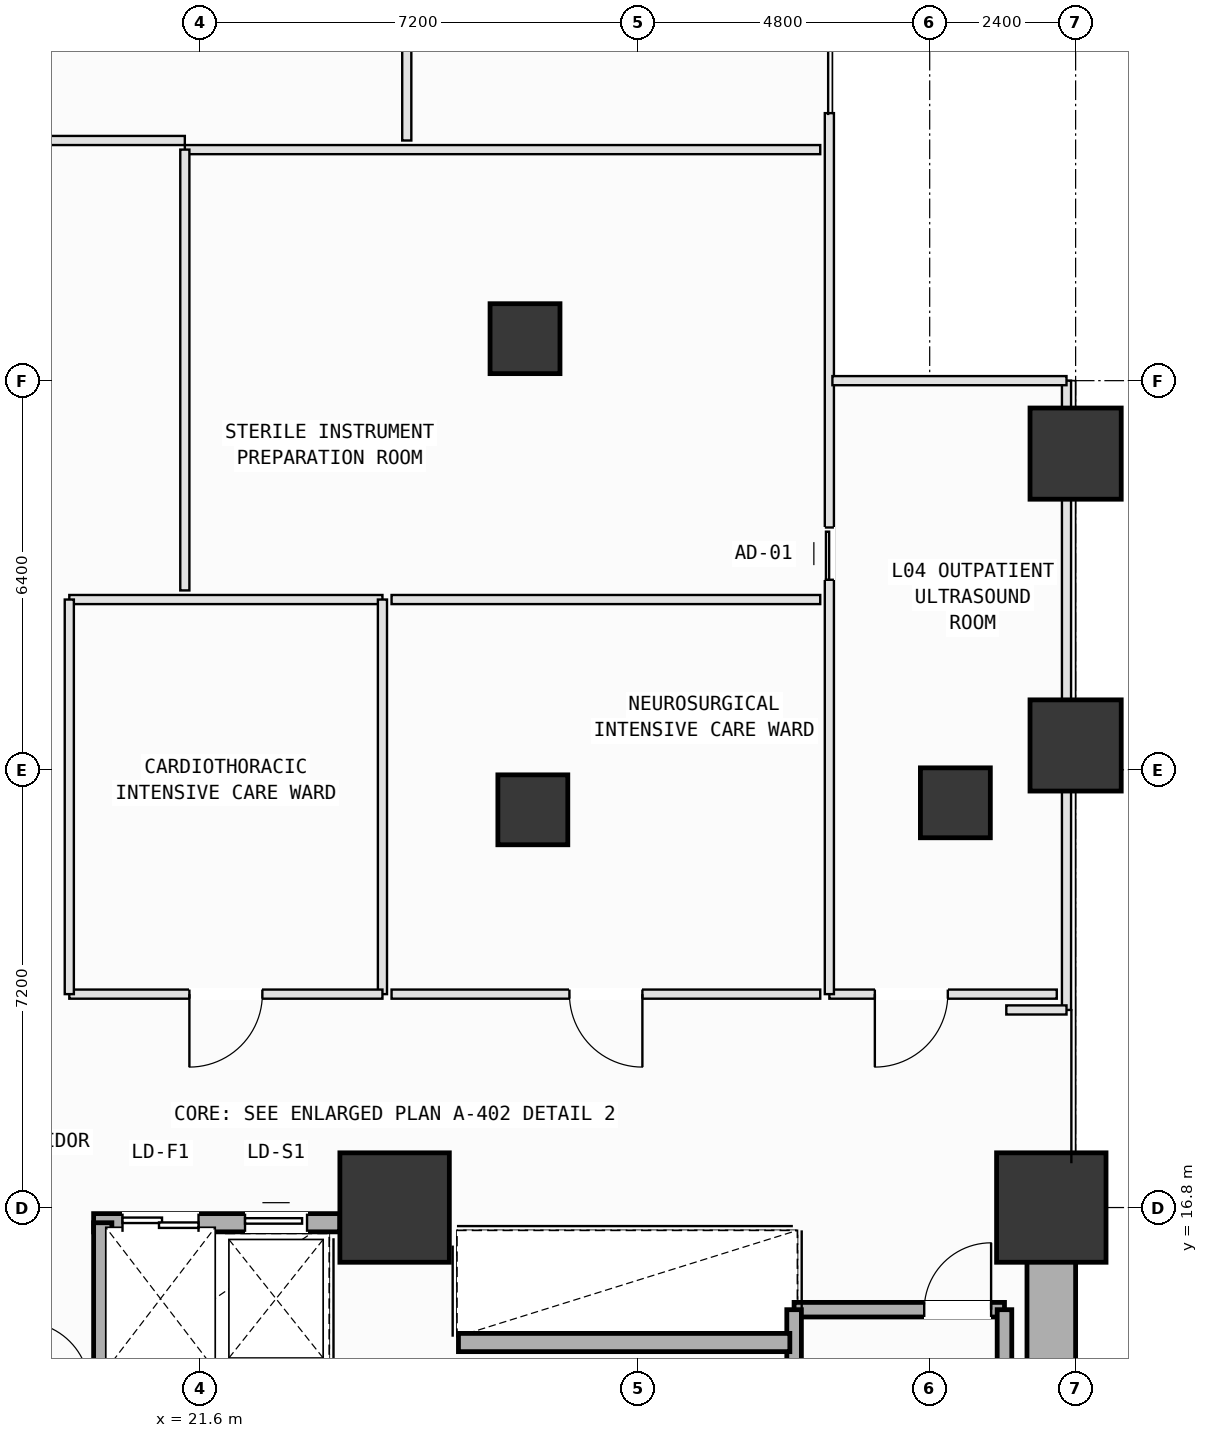
"""IFC4 building model, lengths in metres.
Left out: names, types, materials, properties, quantities, classifications, styles, units other than length and angle.
Written with IfcOpenShell. Run it as: python <this file> out.ifc"""

import sys

from ifc_helpers import new_model, si_unit, direction, frame, frame_2d, origin, origin_2d, place, context, subcontext, project, spatial, rectangle, extrude, element, fill, save


model = new_model("IFC4")
c1 = context("Model", 3, precision=1e-05, world=origin(), true_north=direction((0.0, 1.0)))
c2 = subcontext(c1, "Body", "Model", "MODEL_VIEW")
j1 = project(units=[si_unit("LENGTHUNIT", "METRE"), si_unit("PLANEANGLEUNIT", "RADIAN")], contexts=[c1])
p1 = place(None, origin())
s1 = spatial("IfcSite", under=j1, at=p1, CompositionType="ELEMENT")
p2 = place(p1, origin())
s2 = spatial("IfcBuilding", under=s1, at=p2, CompositionType="ELEMENT")
p3 = place(p2, frame((0.0, 0.0, 21.6)))
s3 = spatial("IfcBuildingStorey", under=s2, at=p3, CompositionType="ELEMENT", Elevation=21.6)
for number, where, z_axis, x_axis in (
    (1, (24.8, 16.8, 0.0), (0.0, 0.0, 1.0), (1.0, 0.0, 0.0)),
    (2, (35.6, 16.8, 0.0), (0.0, 0.0, 1.0), (1.0, 0.0, 0.0)),
):
    element("IfcColumn", number, at=place(p3, frame(where, z_axis=z_axis, x_axis=x_axis)), inside=s3, PredefinedType="COLUMN", context=c2, shape_type="SweptSolid", body=[
        extrude(rectangle(XDim=1.8, YDim=1.8, at=origin_2d()), origin(), (0.0, 0.0, 1.0), 5.4),
    ])
for number, where, z_axis, x_axis in (
    (3, (36.0, 24.4, 0.0), (0.0, 0.0, 1.0), (1.0, 0.0, 0.0)),
    (4, (36.0, 29.2, 0.0), (0.0, 0.0, 1.0), (1.0, 0.0, 0.0)),
):
    element("IfcColumn", number, at=place(p3, frame(where, z_axis=z_axis, x_axis=x_axis)), inside=s3, PredefinedType="PILASTER", context=c2, shape_type="SweptSolid", body=[
        extrude(rectangle(XDim=1.5, YDim=1.5, at=origin_2d()), origin(), (0.0, 0.0, 1.0), 5.4),
    ])
for number, where, z_axis, x_axis in (
    (5, (34.022, 23.457, 0.0), (0.0, 0.0, 1.0), (1.0, 0.0, 0.0)),
    (6, (27.073, 23.342, 0.0), (0.0, 0.0, 1.0), (1.0, 0.0, 0.0)),
    (7, (26.945, 31.091, 0.0), (0.0, 0.0, 1.0), (1.0, 0.0, 0.0)),
):
    element("IfcColumn", number, at=place(p3, frame(where, z_axis=z_axis, x_axis=x_axis)), inside=s3, PredefinedType="COLUMN", context=c2, shape_type="SweptSolid", body=[
        extrude(rectangle(XDim=1.15, YDim=1.15, at=origin_2d()), origin(), (0.0, 0.0, 1.0), 5.4),
    ])
p4 = place(p3, frame((31.37, 15.12, 0.0), z_axis=(0.0, 0.0, 1.0), x_axis=(1.0, 0.0, 0.0)))
e8 = element("IfcWall", 8, at=p4, inside=s3, PredefinedType="SOLIDWALL", context=c2, shape_type="SweptSolid", body=[
    extrude(rectangle(XDim=3.46, YDim=0.24, at=frame_2d((1.73, 0.0))), origin(), (0.0, 0.0, 1.0), 5.1),
])
p5 = place(p4, frame((2.14, 0.0, 0.0)))
e9 = element("IfcOpeningElement", 9, at=p5, cuts=e8, PredefinedType="OPENING", context=c2, shape_type="SweptSolid", body=[
    extrude(rectangle(XDim=1.1, YDim=2.15, at=frame_2d((0.55, 1.075))), frame((0.0, 0.13, 0.0), z_axis=(0.0, -1.0, 0.0), x_axis=(1.0, 0.0, 0.0)), (0.0, 0.0, 1.0), 0.26),
])
for number, where, z_axis, x_axis in (
    (10, (34.83, 15.12, 0.0), (0.0, 0.0, 1.0), (0.0, -1.0, 0.0)),
    (11, (31.37, 8.2, 0.0), (0.0, 0.0, 1.0), (0.0, 1.0, 0.0)),
):
    element("IfcWall", number, at=place(p3, frame(where, z_axis=z_axis, x_axis=x_axis)), inside=s3, PredefinedType="SOLIDWALL", context=c2, shape_type="SweptSolid", body=[
        extrude(rectangle(XDim=6.92, YDim=0.24, at=frame_2d((3.46, 0.0))), origin(), (0.0, 0.0, 1.0), 5.1),
    ])
p6 = place(p3, frame((35.6, 7.8, 0.0), z_axis=(0.0, 0.0, 1.0), x_axis=(0.0, 1.0, 0.0)))
e12 = element("IfcWall", 12, at=p6, inside=s3, PredefinedType="SHEAR", context=c2, shape_type="SweptSolid", body=[
    extrude(rectangle(XDim=9.0, YDim=0.8, at=frame_2d((4.5, 0.0))), origin(), (0.0, 0.0, 1.0), 5.1),
])
p7 = place(p3, frame((19.85, 16.55, 0.0), z_axis=(0.0, 0.0, 1.0), x_axis=(1.0, 0.0, 0.0)))
e13 = element("IfcWall", 13, at=p7, inside=s3, PredefinedType="SOLIDWALL", context=c2, shape_type="SweptSolid", body=[
    extrude(rectangle(XDim=4.05, YDim=0.3, at=frame_2d((2.025, 0.0))), origin(), (0.0, 0.0, 1.0), 5.1),
])
p8 = place(p7, frame((0.475, 0.0, 0.0)))
e14 = element("IfcOpeningElement", 14, at=p8, cuts=e13, PredefinedType="OPENING", context=c2, shape_type="SweptSolid", body=[
    extrude(rectangle(XDim=1.25, YDim=2.18, at=frame_2d((0.625, 1.09))), frame((0.0, 0.16, 0.0), z_axis=(0.0, -1.0, 0.0), x_axis=(1.0, 0.0, 0.0)), (0.0, 0.0, 1.0), 0.32),
])
p9 = place(p7, frame((2.49, 0.0, 0.0)))
e15 = element("IfcOpeningElement", 15, at=p9, cuts=e13, PredefinedType="OPENING", context=c2, shape_type="SweptSolid", body=[
    extrude(rectangle(XDim=1.02, YDim=2.12, at=frame_2d((0.51, 1.06))), frame((0.0, 0.16, 0.0), z_axis=(0.0, -1.0, 0.0), x_axis=(1.0, 0.0, 0.0)), (0.0, 0.0, 1.0), 0.32),
])
p10 = place(p3, frame((20.0, 13.82, 0.0), z_axis=(0.0, 0.0, 1.0), x_axis=(0.0, 1.0, 0.0)))
e16 = element("IfcWall", 16, at=p10, inside=s3, PredefinedType="SOLIDWALL", context=c2, shape_type="SweptSolid", body=[
    extrude(rectangle(XDim=2.73, YDim=0.3, at=frame_2d((1.365, 0.0))), origin(), (0.0, 0.0, 1.0), 5.1),
])
p11 = place(p3, frame((25.85, 14.58, 0.0), z_axis=(0.0, 0.0, 1.0), x_axis=(1.0, 0.0, 0.0)))
e17 = element("IfcWall", 17, at=p11, inside=s3, PredefinedType="SOLIDWALL", context=c2, shape_type="SweptSolid", body=[
    extrude(rectangle(XDim=5.45, YDim=0.3, at=frame_2d((2.725, 0.0))), origin(), (0.0, 0.0, 1.0), 5.1),
])
p12 = place(p3, frame((35.85, 30.4, 0.0), z_axis=(0.0, 0.0, 1.0), x_axis=(0.0, -1.0, 0.0)))
e18 = element("IfcWall", 18, at=p12, inside=s3, PredefinedType="PARTITIONING", context=c2, shape_type="SweptSolid", body=[
    extrude(rectangle(XDim=10.35, YDim=0.15, at=frame_2d((5.175, 0.0))), origin(), (0.0, 0.0, 1.0), 2.685),
])
p13 = place(p3, frame((35.85, 20.05, 0.0), z_axis=(0.0, 0.0, 1.0), x_axis=(-1.0, 0.0, 0.0)))
e19 = element("IfcWall", 19, at=p13, inside=s3, PredefinedType="PARTITIONING", context=c2, shape_type="SweptSolid", body=[
    extrude(rectangle(XDim=0.99, YDim=0.15, at=frame_2d((0.495, 0.0))), origin(), (0.0, 0.0, 1.0), 5.1),
])
p14 = place(p3, frame((35.69, 20.31, 0.0), z_axis=(0.0, 0.0, 1.0), x_axis=(-1.0, 0.0, 0.0)))
e20 = element("IfcWall", 20, at=p14, inside=s3, PredefinedType="PARTITIONING", context=c2, shape_type="SweptSolid", body=[
    extrude(rectangle(XDim=3.74, YDim=0.15, at=frame_2d((1.87, 0.0))), origin(), (0.0, 0.0, 1.0), 5.1),
])
p15 = place(p14, frame((1.792, 0.0, 0.0)))
e21 = element("IfcOpeningElement", 21, at=p15, cuts=e20, PredefinedType="OPENING", context=c2, shape_type="SweptSolid", body=[
    extrude(rectangle(XDim=1.2, YDim=2.15, at=frame_2d((0.6, 1.075))), frame((0.0, 0.085, 0.0), z_axis=(0.0, -1.0, 0.0), x_axis=(1.0, 0.0, 0.0)), (0.0, 0.0, 1.0), 0.17),
])
p16 = place(p3, frame((31.95, 20.31, 0.0), z_axis=(0.0, 0.0, 1.0), x_axis=(0.0, 1.0, 0.0)))
e22 = element("IfcWall", 22, at=p16, inside=s3, PredefinedType="PARTITIONING", context=c2, shape_type="SweptSolid", body=[
    extrude(rectangle(XDim=14.49, YDim=0.15, at=frame_2d((7.245, 0.0))), origin(), (0.0, 0.0, 1.0), 5.1),
])
p17 = place(p16, frame((6.815, 0.0, 0.0)))
e23 = element("IfcOpeningElement", 23, at=p17, cuts=e22, PredefinedType="OPENING", context=c2, shape_type="SweptSolid", body=[
    extrude(rectangle(XDim=0.86, YDim=2.06, at=frame_2d((0.43, 1.03))), frame((0.0, 0.085, 0.0), z_axis=(0.0, -1.0, 0.0), x_axis=(1.0, 0.0, 0.0)), (0.0, 0.0, 1.0), 0.17),
])
p18 = place(p3, frame((32.0, 30.4, 0.0), z_axis=(0.0, 0.0, 1.0), x_axis=(1.0, 0.0, 0.0)))
e24 = element("IfcWall", 24, at=p18, inside=s3, PredefinedType="PARTITIONING", context=c2, shape_type="SweptSolid", body=[
    extrude(rectangle(XDim=3.85, YDim=0.15, at=frame_2d((1.925, 0.0))), origin(), (0.0, 0.0, 1.0), 2.685),
])
p19 = place(p3, frame((19.45, 26.8, 0.0), z_axis=(0.0, 0.0, 1.0), x_axis=(1.0, 0.0, 0.0)))
e25 = element("IfcWall", 25, at=p19, inside=s3, PredefinedType="PARTITIONING", context=c2, shape_type="SweptSolid", body=[
    extrude(rectangle(XDim=5.15, YDim=0.15, at=frame_2d((2.575, 0.0))), origin(), (0.0, 0.0, 1.0), 5.1),
])
p20 = place(p3, frame((24.6, 26.8, 0.0), z_axis=(0.0, 0.0, 1.0), x_axis=(0.0, -1.0, 0.0)))
e26 = element("IfcWall", 26, at=p20, inside=s3, PredefinedType="PARTITIONING", context=c2, shape_type="SweptSolid", body=[
    extrude(rectangle(XDim=6.49, YDim=0.15, at=frame_2d((3.245, 0.0))), origin(), (0.0, 0.0, 1.0), 5.1),
])
p21 = place(p3, frame((24.6, 20.31, 0.0), z_axis=(0.0, 0.0, 1.0), x_axis=(-1.0, 0.0, 0.0)))
e27 = element("IfcWall", 27, at=p21, inside=s3, PredefinedType="PARTITIONING", context=c2, shape_type="SweptSolid", body=[
    extrude(rectangle(XDim=5.15, YDim=0.15, at=frame_2d((2.575, 0.0))), origin(), (0.0, 0.0, 1.0), 5.1),
])
p22 = place(p21, frame((1.975, 0.0, 0.0)))
e28 = element("IfcOpeningElement", 28, at=p22, cuts=e27, PredefinedType="OPENING", context=c2, shape_type="SweptSolid", body=[
    extrude(rectangle(XDim=1.2, YDim=2.15, at=frame_2d((0.6, 1.075))), frame((0.0, 0.085, 0.0), z_axis=(0.0, -1.0, 0.0), x_axis=(1.0, 0.0, 0.0)), (0.0, 0.0, 1.0), 0.17),
])
p23 = place(p3, frame((19.45, 20.31, 0.0), z_axis=(0.0, 0.0, 1.0), x_axis=(0.0, 1.0, 0.0)))
e29 = element("IfcWall", 29, at=p23, inside=s3, PredefinedType="PARTITIONING", context=c2, shape_type="SweptSolid", body=[
    extrude(rectangle(XDim=6.49, YDim=0.15, at=frame_2d((3.245, 0.0))), origin(), (0.0, 0.0, 1.0), 5.1),
])
p24 = place(p3, frame((24.75, 26.8, 0.0), z_axis=(0.0, 0.0, 1.0), x_axis=(1.0, 0.0, 0.0)))
e30 = element("IfcWall", 30, at=p24, inside=s3, PredefinedType="PARTITIONING", context=c2, shape_type="SweptSolid", body=[
    extrude(rectangle(XDim=7.05, YDim=0.15, at=frame_2d((3.525, 0.0))), origin(), (0.0, 0.0, 1.0), 5.1),
])
p25 = place(p3, frame((31.8, 20.31, 0.0), z_axis=(0.0, 0.0, 1.0), x_axis=(-1.0, 0.0, 0.0)))
e31 = element("IfcWall", 31, at=p25, inside=s3, PredefinedType="PARTITIONING", context=c2, shape_type="SweptSolid", body=[
    extrude(rectangle(XDim=7.05, YDim=0.15, at=frame_2d((3.525, 0.0))), origin(), (0.0, 0.0, 1.0), 5.1),
])
p26 = place(p25, frame((2.925, 0.0, 0.0)))
e32 = element("IfcOpeningElement", 32, at=p26, cuts=e31, PredefinedType="OPENING", context=c2, shape_type="SweptSolid", body=[
    extrude(rectangle(XDim=1.2, YDim=2.15, at=frame_2d((0.6, 1.075))), frame((0.0, 0.085, 0.0), z_axis=(0.0, -1.0, 0.0), x_axis=(1.0, 0.0, 0.0)), (0.0, 0.0, 1.0), 0.17),
])
p27 = place(p3, frame((21.35, 34.2, 0.0), z_axis=(0.0, 0.0, 1.0), x_axis=(1.0, 0.0, 0.0)))
e33 = element("IfcWall", 33, at=p27, inside=s3, PredefinedType="PARTITIONING", context=c2, shape_type="SweptSolid", body=[
    extrude(rectangle(XDim=10.45, YDim=0.15, at=frame_2d((5.225, 0.0))), origin(), (0.0, 0.0, 1.0), 5.1),
])
p28 = place(p3, frame((21.35, 26.95, 0.0), z_axis=(0.0, 0.0, 1.0), x_axis=(0.0, 1.0, 0.0)))
e34 = element("IfcWall", 34, at=p28, inside=s3, PredefinedType="PARTITIONING", context=c2, shape_type="SweptSolid", body=[
    extrude(rectangle(XDim=7.25, YDim=0.15, at=frame_2d((3.625, 0.0))), origin(), (0.0, 0.0, 1.0), 5.1),
])
p29 = place(p3, frame((25.0, 41.5, 0.0), z_axis=(0.0, 0.0, 1.0), x_axis=(0.0, -1.0, 0.0)))
e35 = element("IfcWall", 35, at=p29, inside=s3, PredefinedType="PARTITIONING", context=c2, shape_type="SweptSolid", body=[
    extrude(rectangle(XDim=7.15, YDim=0.15, at=frame_2d((3.575, 0.0))), origin(), (0.0, 0.0, 1.0), 5.1),
])
p30 = place(p3, frame((21.35, 34.35, 0.0), z_axis=(0.0, 0.0, 1.0), x_axis=(-1.0, 0.0, 0.0)))
e36 = element("IfcWall", 36, at=p30, inside=s3, PredefinedType="PARTITIONING", context=c2, shape_type="SweptSolid", body=[
    extrude(rectangle(XDim=3.2, YDim=0.15, at=frame_2d((1.6, 0.0))), origin(), (0.0, 0.0, 1.0), 5.1),
])
p31 = place(p5, origin())
e37 = element("IfcDoor", 37, at=p31, inside=s3, OperationType="SINGLE_SWING_RIGHT", PredefinedType="DOOR", context=c2, shape_type="SweptSolid", body=[
    extrude(rectangle(XDim=1.1, YDim=2.15, at=frame_2d((0.55, 1.075))), frame((0.0, 0.025, 0.0), z_axis=(0.0, -1.0, 0.0), x_axis=(1.0, 0.0, 0.0)), (0.0, 0.0, 1.0), 0.05),
])
fill(e9, e37)
p32 = place(p8, origin())
e38 = element("IfcDoor", 38, at=p32, inside=s3, OperationType="DOUBLE_DOOR_SLIDING", PredefinedType="DOOR", context=c2, shape_type="SweptSolid", body=[
    extrude(rectangle(XDim=1.25, YDim=2.18, at=frame_2d((0.625, 1.09))), frame((0.0, 0.025, 0.0), z_axis=(0.0, -1.0, 0.0), x_axis=(1.0, 0.0, 0.0)), (0.0, 0.0, 1.0), 0.05),
])
fill(e14, e38)
p33 = place(p9, origin())
e39 = element("IfcDoor", 39, at=p33, inside=s3, OperationType="SLIDING_TO_LEFT", PredefinedType="DOOR", context=c2, shape_type="SweptSolid", body=[
    extrude(rectangle(XDim=1.02, YDim=2.12, at=frame_2d((0.51, 1.06))), frame((0.0, 0.025, 0.0), z_axis=(0.0, -1.0, 0.0), x_axis=(1.0, 0.0, 0.0)), (0.0, 0.0, 1.0), 0.05),
])
fill(e15, e39)
p34 = place(p15, origin())
e40 = element("IfcDoor", 40, at=p34, inside=s3, OperationType="SINGLE_SWING_RIGHT", PredefinedType="DOOR", context=c2, shape_type="SweptSolid", body=[
    extrude(rectangle(XDim=1.2, YDim=2.15, at=frame_2d((0.6, 1.075))), frame((0.0, 0.025, 0.0), z_axis=(0.0, -1.0, 0.0), x_axis=(1.0, 0.0, 0.0)), (0.0, 0.0, 1.0), 0.05),
])
fill(e21, e40)
p35 = place(p22, origin())
e41 = element("IfcDoor", 41, at=p35, inside=s3, OperationType="SINGLE_SWING_RIGHT", PredefinedType="DOOR", context=c2, shape_type="SweptSolid", body=[
    extrude(rectangle(XDim=1.2, YDim=2.15, at=frame_2d((0.6, 1.075))), frame((0.0, 0.025, 0.0), z_axis=(0.0, -1.0, 0.0), x_axis=(1.0, 0.0, 0.0)), (0.0, 0.0, 1.0), 0.05),
])
fill(e28, e41)
p36 = place(p26, origin())
e42 = element("IfcDoor", 42, at=p36, inside=s3, OperationType="SINGLE_SWING_LEFT", PredefinedType="DOOR", context=c2, shape_type="SweptSolid", body=[
    extrude(rectangle(XDim=1.2, YDim=2.15, at=frame_2d((0.6, 1.075))), frame((0.0, 0.025, 0.0), z_axis=(0.0, -1.0, 0.0), x_axis=(1.0, 0.0, 0.0)), (0.0, 0.0, 1.0), 0.05),
])
fill(e32, e42)
p37 = place(p17, origin())
e43 = element("IfcDoor", 43, at=p37, inside=s3, OperationType="SLIDING_TO_LEFT", PredefinedType="DOOR", context=c2, shape_type="SweptSolid", body=[
    extrude(rectangle(XDim=0.86, YDim=2.06, at=frame_2d((0.43, 1.03))), frame((0.0, 0.025, 0.0), z_axis=(0.0, -1.0, 0.0), x_axis=(1.0, 0.0, 0.0)), (0.0, 0.0, 1.0), 0.05),
])
fill(e23, e43)
save(model, sys.argv[1])
